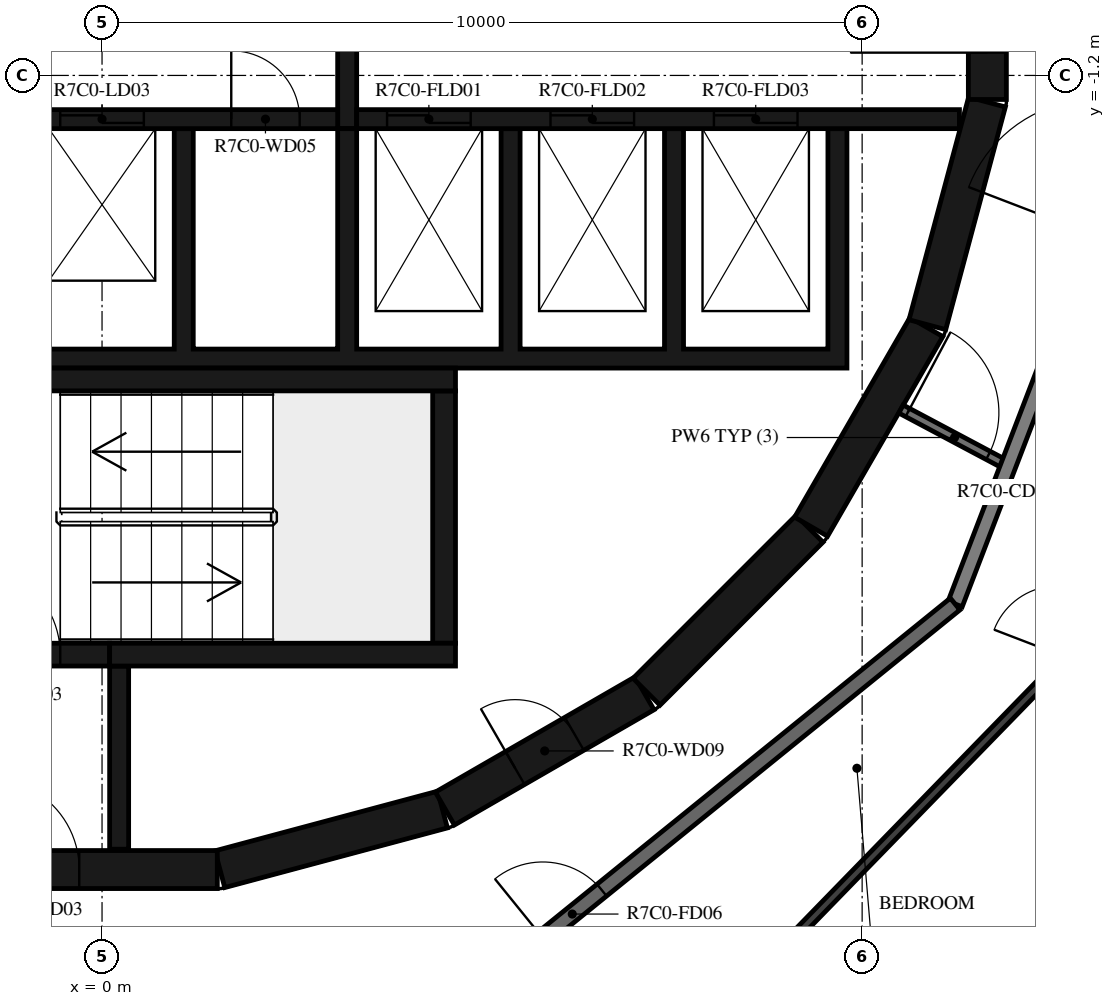
"""IFC4 building model, lengths in metres.
Left out: names, types, materials, properties, quantities, classifications, styles, units other than length and angle.
Written with IfcOpenShell. Run it as: python <this file> out.ifc"""

import sys

from ifc_helpers import new_model, si_unit, direction, frame, frame_2d, origin, place, context, subcontext, project, spatial, polyline, rectangle, outline, extrude, element, fill, save


model = new_model("IFC4")
c1 = context("Model", 3, precision=1e-05, world=origin(), true_north=direction((0.0, 1.0)))
c2 = subcontext(c1, "Body", "Model", "MODEL_VIEW")
j1 = project(units=[si_unit("LENGTHUNIT", "METRE"), si_unit("PLANEANGLEUNIT", "RADIAN")], contexts=[c1])
p1 = place(None, origin())
s1 = spatial("IfcSite", under=j1, at=p1, CompositionType="ELEMENT")
p2 = place(p1, origin())
s2 = spatial("IfcBuilding", under=s1, at=p2, CompositionType="ELEMENT")
p3 = place(p2, frame((0.0, 0.0, 284.4)))
s3 = spatial("IfcBuildingStorey", under=s2, at=p3, CompositionType="ELEMENT", Elevation=284.4)
p4 = place(p3, frame((1.55, -11.643, 0.0), z_axis=(0.0, 0.0, 1.0), x_axis=(0.965948410781, 0.258734743916, 0.0)))
e1 = element("IfcWall", 1, at=p4, inside=s3, PredefinedType="SHEAR", context=c2, shape_type="SweptSolid", body=[
    extrude(rectangle(XDim=3.033, YDim=0.5, at=frame_2d((1.516, 0.0))), origin(), (0.0, 0.0, 1.0), 3.12),
])
p5 = place(p3, frame((4.51, -10.845, 0.0), z_axis=(0.0, 0.0, 1.0), x_axis=(0.865975092491, 0.500087131594, 0.0)))
e2 = element("IfcWall", 2, at=p5, inside=s3, PredefinedType="SHEAR", context=c2, shape_type="SweptSolid", body=[
    extrude(rectangle(XDim=3.033, YDim=0.5, at=frame_2d((1.516, 0.0))), origin(), (0.0, 0.0, 1.0), 3.12),
])
p6 = place(p5, frame((1.066, 0.0, 0.0)))
e3 = element("IfcOpeningElement", 3, at=p6, cuts=e2, PredefinedType="OPENING", context=c2, shape_type="SweptSolid", body=[
    extrude(rectangle(XDim=0.9, YDim=2.1, at=frame_2d((0.45, 1.05))), frame((0.0, 0.26, 0.0), z_axis=(0.0, -1.0, 0.0), x_axis=(1.0, 0.0, 0.0)), (0.0, 0.0, 1.0), 0.52),
])
p7 = place(p3, frame((7.164, -9.308, 0.0), z_axis=(0.0, 0.0, 1.0), x_axis=(0.707106781187, 0.707106781187, 0.0)))
e4 = element("IfcWall", 4, at=p7, inside=s3, PredefinedType="SHEAR", context=c2, shape_type="SweptSolid", body=[
    extrude(rectangle(XDim=3.032, YDim=0.5, at=frame_2d((1.516, 0.0))), origin(), (0.0, 0.0, 1.0), 3.12),
])
for number, where, z_axis, x_axis in (
    (5, (9.329, -7.137, 0.0), (0.0, 0.0, 1.0), (0.5, 0.866, 0.0)),
    (6, (10.858, -4.479, 0.0), (0.0, 0.0, 1.0), (0.259, 0.966, 0.0)),
):
    element("IfcWall", number, at=place(p3, frame(where, z_axis=z_axis, x_axis=x_axis)), inside=s3, PredefinedType="SHEAR", context=c2, shape_type="SweptSolid", body=[
        extrude(rectangle(XDim=3.033, YDim=0.5, at=frame_2d((1.516, 0.0))), origin(), (0.0, 0.0, 1.0), 3.12),
    ])
p8 = place(p3, frame((11.647, -1.516, 0.0), z_axis=(0.0, 0.0, 1.0), x_axis=(0.0, 1.0, 0.0)))
e7 = element("IfcWall", 7, at=p8, inside=s3, PredefinedType="SHEAR", context=c2, shape_type="SweptSolid", body=[
    extrude(rectangle(XDim=3.033, YDim=0.5, at=frame_2d((1.516, 0.0))), origin(), (0.0, 0.0, 1.0), 3.12),
])
p9 = place(p8, frame((0.616, 0.0, 0.0)))
e8 = element("IfcOpeningElement", 8, at=p9, cuts=e7, PredefinedType="OPENING", context=c2, shape_type="SweptSolid", body=[
    extrude(rectangle(XDim=1.8, YDim=2.1, at=frame_2d((0.9, 1.05))), frame((0.0, 0.26, 0.0), z_axis=(0.0, -1.0, 0.0), x_axis=(1.0, 0.0, 0.0)), (0.0, 0.0, 1.0), 0.52),
])
p10 = place(p3, frame((-1.516, -11.647, 0.0), z_axis=(0.0, 0.0, 1.0), x_axis=(1.0, 0.0, 0.0)))
e9 = element("IfcWall", 9, at=p10, inside=s3, PredefinedType="SHEAR", context=c2, shape_type="SweptSolid", body=[
    extrude(rectangle(XDim=3.033, YDim=0.5, at=frame_2d((1.516, 0.0))), origin(), (0.0, 0.0, 1.0), 3.12),
])
p11 = place(p10, frame((0.016, 0.0, 0.0)))
e10 = element("IfcOpeningElement", 10, at=p11, cuts=e9, PredefinedType="OPENING", context=c2, shape_type="SweptSolid", body=[
    extrude(rectangle(XDim=1.2, YDim=2.1, at=frame_2d((0.6, 1.05))), frame((0.0, 0.26, 0.0), z_axis=(0.0, -1.0, 0.0), x_axis=(1.0, 0.0, 0.0)), (0.0, 0.0, 1.0), 0.52),
])
p12 = place(p3, frame((-2.4, -5.2, 0.0), z_axis=(0.0, 0.0, 1.0), x_axis=(1.0, 0.0, 0.0)))
e11 = element("IfcWall", 11, at=p12, inside=s3, PredefinedType="SHEAR", context=c2, shape_type="SweptSolid", body=[
    extrude(rectangle(XDim=7.05, YDim=0.3, at=frame_2d((3.525, 0.0))), origin(), (0.0, 0.0, 1.0), 3.12),
])
p13 = place(p3, frame((4.5, -8.67, 0.0), z_axis=(0.0, 0.0, 1.0), x_axis=(0.0, 1.0, 0.0)))
e12 = element("IfcWall", 12, at=p13, inside=s3, PredefinedType="SHEAR", context=c2, shape_type="SweptSolid", body=[
    extrude(rectangle(XDim=3.32, YDim=0.3, at=frame_2d((1.66, 0.0))), origin(), (0.0, 0.0, 1.0), 3.12),
])
p14 = place(p3, frame((0.1, -8.82, 0.0), z_axis=(0.0, 0.0, 1.0), x_axis=(1.0, 0.0, 0.0)))
e13 = element("IfcWall", 13, at=p14, inside=s3, PredefinedType="SHEAR", context=c2, shape_type="SweptSolid", body=[
    extrude(rectangle(XDim=4.55, YDim=0.3, at=frame_2d((2.275, 0.0))), origin(), (0.0, 0.0, 1.0), 3.12),
])
p15 = place(p3, frame((-2.4, -8.82, 0.0), z_axis=(0.0, 0.0, 1.0), x_axis=(1.0, 0.0, 0.0)))
e14 = element("IfcWall", 14, at=p15, inside=s3, PredefinedType="SHEAR", context=c2, shape_type="SweptSolid", body=[
    extrude(rectangle(XDim=2.5, YDim=0.3, at=frame_2d((1.25, 0.0))), origin(), (0.0, 0.0, 1.0), 3.12),
])
p16 = place(p15, frame((0.65, 0.0, 0.0)))
e15 = element("IfcOpeningElement", 15, at=p16, cuts=e14, PredefinedType="OPENING", context=c2, shape_type="SweptSolid", body=[
    extrude(rectangle(XDim=1.2, YDim=2.1, at=frame_2d((0.6, 1.05))), frame((0.0, 0.16, 0.0), z_axis=(0.0, -1.0, 0.0), x_axis=(1.0, 0.0, 0.0)), (0.0, 0.0, 1.0), 0.32),
])
p17 = place(p3, frame((0.225, -8.97, 0.0), z_axis=(0.0, 0.0, 1.0), x_axis=(0.0, -1.0, 0.0)))
e16 = element("IfcWall", 16, at=p17, inside=s3, PredefinedType="SHEAR", context=c2, shape_type="SweptSolid", body=[
    extrude(rectangle(XDim=2.41, YDim=0.25, at=frame_2d((1.205, 0.0))), origin(), (0.0, 0.0, 1.0), 3.12),
])
p18 = place(p3, origin())
e17 = element("IfcWall", 17, at=p18, inside=s3, PredefinedType="SHEAR", context=c2, shape_type="SweptSolid", body=[
    extrude(outline(polyline([(9.8, -5.05), (9.8, -4.8), (9.8, -1.9), (9.55, -1.9), (9.55, -4.8), (7.65, -4.8), (7.65, -1.9), (7.4, -1.9), (7.4, -4.8), (5.5, -4.8), (5.5, -1.9), (5.25, -1.9), (5.25, -4.8), (3.35, -4.8), (3.35, -1.9), (3.1, -1.9), (3.1, -4.8), (1.2, -4.8), (1.2, -1.9), (0.95, -1.9), (0.95, -4.8), (-0.95, -4.8), (-0.95, -1.9), (-1.2, -1.9), (-1.2, -4.8), (-3.1, -4.8), (-3.1, -1.9), (-3.35, -1.9), (-3.35, -4.8), (-5.25, -4.8), (-5.25, -1.9), (-5.5, -1.9), (-5.5, -4.8), (-9.55, -4.8), (-9.55, -1.9), (-9.8, -1.9), (-9.8, -4.8), (-9.8, -5.05), (9.8, -5.05)])), origin(), (0.0, 0.0, 1.0), 3.12),
])
p19 = place(p3, frame((-11.28, -1.775, 0.0), z_axis=(0.0, 0.0, 1.0), x_axis=(1.0, 0.0, 0.0)))
e18 = element("IfcWall", 18, at=p19, inside=s3, PredefinedType="SHEAR", context=c2, shape_type="SweptSolid", body=[
    extrude(rectangle(XDim=14.38, YDim=0.25, at=frame_2d((7.19, 0.0))), origin(), (0.0, 0.0, 1.0), 3.12),
])
p20 = place(p19, frame((6.43, 0.0, 0.0)))
e19 = element("IfcOpeningElement", 19, at=p20, cuts=e18, PredefinedType="OPENING", context=c2, shape_type="SweptSolid", body=[
    extrude(rectangle(XDim=1.1, YDim=2.1, at=frame_2d((0.55, 1.05))), frame((0.0, 0.135, 0.0), z_axis=(0.0, -1.0, 0.0), x_axis=(1.0, 0.0, 0.0)), (0.0, 0.0, 1.0), 0.27),
])
p21 = place(p19, frame((8.58, 0.0, 0.0)))
e20 = element("IfcOpeningElement", 20, at=p21, cuts=e18, PredefinedType="OPENING", context=c2, shape_type="SweptSolid", body=[
    extrude(rectangle(XDim=1.1, YDim=2.1, at=frame_2d((0.55, 1.05))), frame((0.0, 0.135, 0.0), z_axis=(0.0, -1.0, 0.0), x_axis=(1.0, 0.0, 0.0)), (0.0, 0.0, 1.0), 0.27),
])
p22 = place(p19, frame((10.73, 0.0, 0.0)))
e21 = element("IfcOpeningElement", 21, at=p22, cuts=e18, PredefinedType="OPENING", context=c2, shape_type="SweptSolid", body=[
    extrude(rectangle(XDim=1.1, YDim=2.1, at=frame_2d((0.55, 1.05))), frame((0.0, 0.135, 0.0), z_axis=(0.0, -1.0, 0.0), x_axis=(1.0, 0.0, 0.0)), (0.0, 0.0, 1.0), 0.27),
])
p23 = place(p19, frame((3.305, 0.0, 0.0)))
e22 = element("IfcOpeningElement", 22, at=p23, cuts=e18, PredefinedType="OPENING", context=c2, shape_type="SweptSolid", body=[
    extrude(rectangle(XDim=0.9, YDim=2.1, at=frame_2d((0.45, 1.05))), frame((0.0, 0.135, 0.0), z_axis=(0.0, -1.0, 0.0), x_axis=(1.0, 0.0, 0.0)), (0.0, 0.0, 1.0), 0.27),
])
p24 = place(p19, frame((12.98, 0.0, 0.0)))
e23 = element("IfcOpeningElement", 23, at=p24, cuts=e18, PredefinedType="OPENING", context=c2, shape_type="SweptSolid", body=[
    extrude(rectangle(XDim=0.9, YDim=2.1, at=frame_2d((0.45, 1.05))), frame((0.0, 0.135, 0.0), z_axis=(0.0, -1.0, 0.0), x_axis=(1.0, 0.0, 0.0)), (0.0, 0.0, 1.0), 0.27),
])
p25 = place(p3, frame((3.35, -1.775, 0.0), z_axis=(0.0, 0.0, 1.0), x_axis=(1.0, 0.0, 0.0)))
e24 = element("IfcWall", 24, at=p25, inside=s3, PredefinedType="SHEAR", context=c2, shape_type="SweptSolid", body=[
    extrude(rectangle(XDim=7.93, YDim=0.25, at=frame_2d((3.965, 0.0))), origin(), (0.0, 0.0, 1.0), 3.12),
])
p26 = place(p25, frame((0.4, 0.0, 0.0)))
e25 = element("IfcOpeningElement", 25, at=p26, cuts=e24, PredefinedType="OPENING", context=c2, shape_type="SweptSolid", body=[
    extrude(rectangle(XDim=1.1, YDim=2.4, at=frame_2d((0.55, 1.2))), frame((0.0, 0.135, 0.0), z_axis=(0.0, -1.0, 0.0), x_axis=(1.0, 0.0, 0.0)), (0.0, 0.0, 1.0), 0.27),
])
p27 = place(p25, frame((2.55, 0.0, 0.0)))
e26 = element("IfcOpeningElement", 26, at=p27, cuts=e24, PredefinedType="OPENING", context=c2, shape_type="SweptSolid", body=[
    extrude(rectangle(XDim=1.1, YDim=2.4, at=frame_2d((0.55, 1.2))), frame((0.0, 0.135, 0.0), z_axis=(0.0, -1.0, 0.0), x_axis=(1.0, 0.0, 0.0)), (0.0, 0.0, 1.0), 0.27),
])
p28 = place(p25, frame((4.7, 0.0, 0.0)))
e27 = element("IfcOpeningElement", 27, at=p28, cuts=e24, PredefinedType="OPENING", context=c2, shape_type="SweptSolid", body=[
    extrude(rectangle(XDim=1.1, YDim=2.4, at=frame_2d((0.55, 1.2))), frame((0.0, 0.135, 0.0), z_axis=(0.0, -1.0, 0.0), x_axis=(1.0, 0.0, 0.0)), (0.0, 0.0, 1.0), 0.27),
])
p29 = place(p3, frame((3.225, -1.9, 0.0), z_axis=(0.0, 0.0, 1.0), x_axis=(0.0, 1.0, 0.0)))
e28 = element("IfcWall", 28, at=p29, inside=s3, PredefinedType="SHEAR", context=c2, shape_type="SweptSolid", body=[
    extrude(rectangle(XDim=3.8, YDim=0.25, at=frame_2d((1.9, 0.0))), origin(), (0.0, 0.0, 1.0), 3.12),
])
p30 = place(p3, frame((10.511, -5.589, 0.0), z_axis=(0.0, 0.0, 1.0), x_axis=(0.882983002821, -0.469404960273, 0.0)))
e29 = element("IfcWall", 29, at=p30, inside=s3, PredefinedType="PARTITIONING", context=c2, shape_type="SweptSolid", body=[
    extrude(rectangle(XDim=1.596, YDim=0.12, at=frame_2d((0.798, 0.0))), origin(), (0.0, 0.0, 1.0), 3.12),
])
p31 = place(p30, frame((0.1, 0.0, 0.0)))
e30 = element("IfcOpeningElement", 30, at=p31, cuts=e29, PredefinedType="OPENING", context=c2, shape_type="SweptSolid", body=[
    extrude(rectangle(XDim=1.2, YDim=2.1, at=frame_2d((0.6, 1.05))), frame((0.0, 0.07, 0.0), z_axis=(0.0, -1.0, 0.0), x_axis=(1.0, 0.0, 0.0)), (0.0, 0.0, 1.0), 0.14),
])
p32 = place(p3, frame((11.223, -8.154, 0.0), z_axis=(0.0, 0.0, 1.0), x_axis=(0.358341090983, 0.93359073609, 0.0)))
e31 = element("IfcWall", 31, at=p32, inside=s3, PredefinedType="STANDARD", context=c2, shape_type="SweptSolid", body=[
    extrude(rectangle(XDim=7.181, YDim=0.2, at=frame_2d((3.59, 0.0))), origin(), (0.0, 0.0, 1.0), 3.12),
])
p33 = place(p32, frame((5.185, 0.0, 0.0)))
e32 = element("IfcOpeningElement", 32, at=p33, cuts=e31, PredefinedType="OPENING", context=c2, shape_type="SweptSolid", body=[
    extrude(rectangle(XDim=1.8, YDim=2.1, at=frame_2d((0.9, 1.05))), frame((0.0, 0.11, 0.0), z_axis=(0.0, -1.0, 0.0), x_axis=(1.0, 0.0, 0.0)), (0.0, 0.0, 1.0), 0.22),
])
p34 = place(p3, frame((5.643, -12.673, 0.0), z_axis=(0.0, 0.0, 1.0), x_axis=(0.777160148113, 0.629302871585, 0.0)))
e33 = element("IfcWall", 33, at=p34, inside=s3, PredefinedType="STANDARD", context=c2, shape_type="SweptSolid", body=[
    extrude(rectangle(XDim=7.181, YDim=0.2, at=frame_2d((3.59, 0.0))), origin(), (0.0, 0.0, 1.0), 3.12),
])
p35 = place(p34, frame((0.2, 0.0, 0.0)))
e34 = element("IfcOpeningElement", 34, at=p35, cuts=e33, PredefinedType="OPENING", context=c2, shape_type="SweptSolid", body=[
    extrude(rectangle(XDim=1.0, YDim=2.1, at=frame_2d((0.5, 1.05))), frame((0.0, 0.11, 0.0), z_axis=(0.0, -1.0, 0.0), x_axis=(1.0, 0.0, 0.0)), (0.0, 0.0, 1.0), 0.22),
])
p36 = place(p3, frame((7.007, -14.692, 0.0), z_axis=(0.0, 0.0, 1.0), x_axis=(0.697286714348, 0.716792325568, 0.0)))
e35 = element("IfcWall", 35, at=p36, inside=s3, PredefinedType="PARTITIONING", context=c2, shape_type="SweptSolid", body=[
    extrude(rectangle(XDim=7.848, YDim=0.12, at=frame_2d((3.924, 0.0))), origin(), (0.0, 0.0, 1.0), 3.12),
])
p37 = place(p36, frame((0.2, 0.0, 0.0)))
e36 = element("IfcOpeningElement", 36, at=p37, cuts=e35, PredefinedType="OPENING", context=c2, shape_type="SweptSolid", body=[
    extrude(rectangle(XDim=0.9, YDim=2.1, at=frame_2d((0.45, 1.05))), frame((0.0, 0.07, 0.0), z_axis=(0.0, -1.0, 0.0), x_axis=(1.0, 0.0, 0.0)), (0.0, 0.0, 1.0), 0.14),
])
p38 = place(p16, origin())
e37 = element("IfcDoor", 37, at=p38, inside=s3, OperationType="SINGLE_SWING_LEFT", PredefinedType="DOOR", context=c2, shape_type="SweptSolid", body=[
    extrude(rectangle(XDim=1.2, YDim=2.1, at=frame_2d((0.6, 1.05))), frame((0.0, 0.025, 0.0), z_axis=(0.0, -1.0, 0.0), x_axis=(1.0, 0.0, 0.0)), (0.0, 0.0, 1.0), 0.05),
])
fill(e15, e37)
p39 = place(p11, origin())
e38 = element("IfcDoor", 38, at=p39, inside=s3, OperationType="SINGLE_SWING_RIGHT", PredefinedType="DOOR", context=c2, shape_type="SweptSolid", body=[
    extrude(rectangle(XDim=1.2, YDim=2.1, at=frame_2d((0.6, 1.05))), frame((0.0, 0.025, 0.0), z_axis=(0.0, -1.0, 0.0), x_axis=(1.0, 0.0, 0.0)), (0.0, 0.0, 1.0), 0.05),
])
fill(e10, e38)
p40 = place(p9, origin())
e39 = element("IfcDoor", 39, at=p40, inside=s3, OperationType="DOUBLE_DOOR_SINGLE_SWING", PredefinedType="DOOR", context=c2, shape_type="SweptSolid", body=[
    extrude(rectangle(XDim=1.8, YDim=2.1, at=frame_2d((0.9, 1.05))), frame((0.0, 0.025, 0.0), z_axis=(0.0, -1.0, 0.0), x_axis=(1.0, 0.0, 0.0)), (0.0, 0.0, 1.0), 0.05),
])
fill(e8, e39)
p41 = place(p22, origin())
e40 = element("IfcDoor", 40, at=p41, inside=s3, OperationType="DOUBLE_DOOR_SLIDING", PredefinedType="DOOR", context=c2, shape_type="SweptSolid", body=[
    extrude(rectangle(XDim=1.1, YDim=2.1, at=frame_2d((0.55, 1.05))), frame((0.0, 0.025, 0.0), z_axis=(0.0, -1.0, 0.0), x_axis=(1.0, 0.0, 0.0)), (0.0, 0.0, 1.0), 0.05),
])
fill(e21, e40)
p42 = place(p26, origin())
e41 = element("IfcDoor", 41, at=p42, inside=s3, OperationType="DOUBLE_DOOR_SLIDING", PredefinedType="DOOR", context=c2, shape_type="SweptSolid", body=[
    extrude(rectangle(XDim=1.1, YDim=2.4, at=frame_2d((0.55, 1.2))), frame((0.0, 0.025, 0.0), z_axis=(0.0, -1.0, 0.0), x_axis=(1.0, 0.0, 0.0)), (0.0, 0.0, 1.0), 0.05),
])
fill(e25, e41)
p43 = place(p27, origin())
e42 = element("IfcDoor", 42, at=p43, inside=s3, OperationType="DOUBLE_DOOR_SLIDING", PredefinedType="DOOR", context=c2, shape_type="SweptSolid", body=[
    extrude(rectangle(XDim=1.1, YDim=2.4, at=frame_2d((0.55, 1.2))), frame((0.0, 0.025, 0.0), z_axis=(0.0, -1.0, 0.0), x_axis=(1.0, 0.0, 0.0)), (0.0, 0.0, 1.0), 0.05),
])
fill(e26, e42)
p44 = place(p28, origin())
e43 = element("IfcDoor", 43, at=p44, inside=s3, OperationType="DOUBLE_DOOR_SLIDING", PredefinedType="DOOR", context=c2, shape_type="SweptSolid", body=[
    extrude(rectangle(XDim=1.1, YDim=2.4, at=frame_2d((0.55, 1.2))), frame((0.0, 0.025, 0.0), z_axis=(0.0, -1.0, 0.0), x_axis=(1.0, 0.0, 0.0)), (0.0, 0.0, 1.0), 0.05),
])
fill(e27, e43)
p45 = place(p24, origin())
e44 = element("IfcDoor", 44, at=p45, inside=s3, OperationType="SINGLE_SWING_LEFT", PredefinedType="DOOR", context=c2, shape_type="SweptSolid", body=[
    extrude(rectangle(XDim=0.9, YDim=2.1, at=frame_2d((0.45, 1.05))), frame((0.0, 0.025, 0.0), z_axis=(0.0, -1.0, 0.0), x_axis=(1.0, 0.0, 0.0)), (0.0, 0.0, 1.0), 0.05),
])
fill(e23, e44)
p46 = place(p6, origin())
e45 = element("IfcDoor", 45, at=p46, inside=s3, OperationType="SINGLE_SWING_LEFT", PredefinedType="DOOR", context=c2, shape_type="SweptSolid", body=[
    extrude(rectangle(XDim=0.9, YDim=2.1, at=frame_2d((0.45, 1.05))), frame((0.0, 0.025, 0.0), z_axis=(0.0, -1.0, 0.0), x_axis=(1.0, 0.0, 0.0)), (0.0, 0.0, 1.0), 0.05),
])
fill(e3, e45)
p47 = place(p35, origin())
e46 = element("IfcDoor", 46, at=p47, inside=s3, OperationType="SINGLE_SWING_LEFT", PredefinedType="DOOR", context=c2, shape_type="SweptSolid", body=[
    extrude(rectangle(XDim=1.0, YDim=2.1, at=frame_2d((0.5, 1.05))), frame((0.0, 0.025, 0.0), z_axis=(0.0, -1.0, 0.0), x_axis=(1.0, 0.0, 0.0)), (0.0, 0.0, 1.0), 0.05),
])
fill(e34, e46)
p48 = place(p31, origin())
e47 = element("IfcDoor", 47, at=p48, inside=s3, OperationType="DOUBLE_DOOR_SINGLE_SWING", PredefinedType="DOOR", context=c2, shape_type="SweptSolid", body=[
    extrude(rectangle(XDim=1.2, YDim=2.1, at=frame_2d((0.6, 1.05))), frame((0.0, 0.025, 0.0), z_axis=(0.0, -1.0, 0.0), x_axis=(1.0, 0.0, 0.0)), (0.0, 0.0, 1.0), 0.05),
])
fill(e30, e47)
save(model, sys.argv[1])
